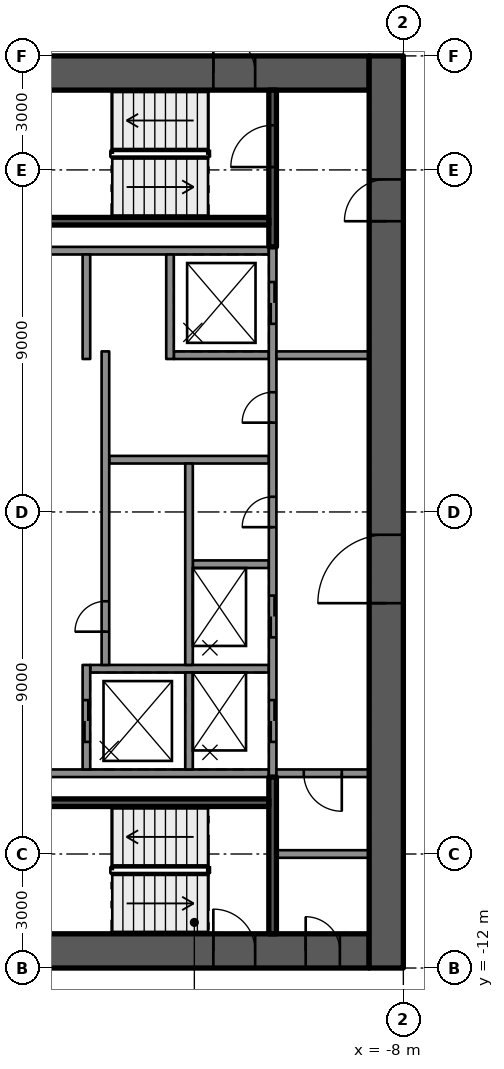
"""IFC4 building model, lengths in metres.
Left out: names, types, materials, properties, quantities, classifications, styles, units other than length and angle.
Written with IfcOpenShell. Run it as: python <this file> out.ifc"""

import sys

from ifc_helpers import new_model, si_unit, direction, frame, frame_2d, origin, place, context, subcontext, project, spatial, rectangle, extrude, element, fill, save


model = new_model("IFC4")
c1 = context("Model", 3, precision=1e-05, world=origin(), true_north=direction((0.0, 1.0)))
c2 = subcontext(c1, "Body", "Model", "MODEL_VIEW")
j1 = project(units=[si_unit("LENGTHUNIT", "METRE"), si_unit("PLANEANGLEUNIT", "RADIAN")], contexts=[c1])
p1 = place(None, origin())
s1 = spatial("IfcSite", under=j1, at=p1, CompositionType="ELEMENT")
p2 = place(p1, origin())
s2 = spatial("IfcBuilding", under=s1, at=p2, CompositionType="ELEMENT")
p3 = place(p2, frame((0.0, 0.0, 246.0)))
s3 = spatial("IfcBuildingStorey", under=s2, at=p3, CompositionType="ELEMENT", Elevation=246.0)
p4 = place(p3, frame((-18.1, 11.55, 0.0), z_axis=(0.0, 0.0, 1.0), x_axis=(1.0, 0.0, 0.0)))
e1 = element("IfcWall", 1, at=p4, inside=s3, PredefinedType="SHEAR", context=c2, shape_type="SweptSolid", body=[
    extrude(rectangle(XDim=9.2, YDim=0.9, at=frame_2d((4.6, 0.0))), origin(), (0.0, 0.0, 1.0), 3.5),
])
p5 = place(p4, frame((5.1, 0.0, 0.0)))
e2 = element("IfcOpeningElement", 2, at=p5, cuts=e1, PredefinedType="OPENING", context=c2, shape_type="SweptSolid", body=[
    extrude(rectangle(XDim=1.1, YDim=2.1, at=frame_2d((0.55, 1.05))), frame((0.0, 0.46, 0.0), z_axis=(0.0, -1.0, 0.0), x_axis=(1.0, 0.0, 0.0)), (0.0, 0.0, 1.0), 0.92),
])
p6 = place(p3, frame((-18.1, -11.55, 0.0), z_axis=(0.0, 0.0, 1.0), x_axis=(1.0, 0.0, 0.0)))
e3 = element("IfcWall", 3, at=p6, inside=s3, PredefinedType="SHEAR", context=c2, shape_type="SweptSolid", body=[
    extrude(rectangle(XDim=9.2, YDim=0.9, at=frame_2d((4.6, 0.0))), origin(), (0.0, 0.0, 1.0), 3.5),
])
p7 = place(p6, frame((5.1, 0.0, 0.0)))
e4 = element("IfcOpeningElement", 4, at=p7, cuts=e3, PredefinedType="OPENING", context=c2, shape_type="SweptSolid", body=[
    extrude(rectangle(XDim=1.1, YDim=2.1, at=frame_2d((0.55, 1.05))), frame((0.0, 0.46, 0.0), z_axis=(0.0, -1.0, 0.0), x_axis=(1.0, 0.0, 0.0)), (0.0, 0.0, 1.0), 0.92),
])
p8 = place(p6, frame((7.53, 0.0, 0.0)))
e5 = element("IfcOpeningElement", 5, at=p8, cuts=e3, PredefinedType="OPENING", context=c2, shape_type="SweptSolid", body=[
    extrude(rectangle(XDim=0.9, YDim=2.1, at=frame_2d((0.45, 1.05))), frame((0.0, 0.46, 0.0), z_axis=(0.0, -1.0, 0.0), x_axis=(1.0, 0.0, 0.0)), (0.0, 0.0, 1.0), 0.92),
])
p9 = place(p3, frame((-8.45, -12.0, 0.0), z_axis=(0.0, 0.0, 1.0), x_axis=(0.0, 1.0, 0.0)))
e6 = element("IfcWall", 6, at=p9, inside=s3, PredefinedType="SHEAR", context=c2, shape_type="SweptSolid", body=[
    extrude(rectangle(XDim=24.0, YDim=0.9, at=frame_2d((12.0, 0.0))), origin(), (0.0, 0.0, 1.0), 3.5),
])
p10 = place(p9, frame((9.6, 0.0, 0.0)))
e7 = element("IfcOpeningElement", 7, at=p10, cuts=e6, PredefinedType="OPENING", context=c2, shape_type="SweptSolid", body=[
    extrude(rectangle(XDim=1.8, YDim=2.1, at=frame_2d((0.9, 1.05))), frame((0.0, 0.46, 0.0), z_axis=(0.0, -1.0, 0.0), x_axis=(1.0, 0.0, 0.0)), (0.0, 0.0, 1.0), 0.92),
])
p11 = place(p9, frame((19.65, 0.0, 0.0)))
e8 = element("IfcOpeningElement", 8, at=p11, cuts=e6, PredefinedType="OPENING", context=c2, shape_type="SweptSolid", body=[
    extrude(rectangle(XDim=1.1, YDim=2.1, at=frame_2d((0.55, 1.05))), frame((0.0, 0.46, 0.0), z_axis=(0.0, -1.0, 0.0), x_axis=(1.0, 0.0, 0.0)), (0.0, 0.0, 1.0), 0.92),
])
for number, where, z_axis, x_axis in (
    (9, (-11.54, 6.875, 0.0), (0.0, 0.0, 1.0), (-1.0, 0.0, 0.0)),
    (10, (-11.54, -6.875, 0.0), (0.0, 0.0, 1.0), (-1.0, 0.0, 0.0)),
):
    element("IfcWall", number, at=place(p3, frame(where, z_axis=z_axis, x_axis=x_axis)), inside=s3, PredefinedType="SOLIDWALL", context=c2, shape_type="SweptSolid", body=[
        extrude(rectangle(XDim=6.56, YDim=0.2, at=frame_2d((3.28, 0.0))), origin(), (0.0, 0.0, 1.0), 3.08),
    ])
p12 = place(p3, frame((-11.54, -4.125, 0.0), z_axis=(0.0, 0.0, 1.0), x_axis=(-1.0, 0.0, 0.0)))
e11 = element("IfcWall", 11, at=p12, inside=s3, PredefinedType="SOLIDWALL", context=c2, shape_type="SweptSolid", body=[
    extrude(rectangle(XDim=4.7, YDim=0.2, at=frame_2d((2.35, 0.0))), origin(), (0.0, 0.0, 1.0), 3.08),
])
p13 = place(p3, frame((-11.54, -1.375, 0.0), z_axis=(0.0, 0.0, 1.0), x_axis=(-1.0, 0.0, 0.0)))
e12 = element("IfcWall", 12, at=p13, inside=s3, PredefinedType="SOLIDWALL", context=c2, shape_type="SweptSolid", body=[
    extrude(rectangle(XDim=2.0, YDim=0.2, at=frame_2d((1.0, 0.0))), origin(), (0.0, 0.0, 1.0), 3.08),
])
p14 = place(p3, frame((-11.54, 1.375, 0.0), z_axis=(0.0, 0.0, 1.0), x_axis=(-1.0, 0.0, 0.0)))
e13 = element("IfcWall", 13, at=p14, inside=s3, PredefinedType="SOLIDWALL", context=c2, shape_type="SweptSolid", body=[
    extrude(rectangle(XDim=4.2, YDim=0.2, at=frame_2d((2.1, 0.0))), origin(), (0.0, 0.0, 1.0), 3.08),
])
p15 = place(p3, frame((-11.54, 4.125, 0.0), z_axis=(0.0, 0.0, 1.0), x_axis=(-1.0, 0.0, 0.0)))
e14 = element("IfcWall", 14, at=p15, inside=s3, PredefinedType="SOLIDWALL", context=c2, shape_type="SweptSolid", body=[
    extrude(rectangle(XDim=2.5, YDim=0.2, at=frame_2d((1.25, 0.0))), origin(), (0.0, 0.0, 1.0), 3.08),
])
p16 = place(p3, frame((-11.44, -6.975, 0.0), z_axis=(0.0, 0.0, 1.0), x_axis=(0.0, 1.0, 0.0)))
e15 = element("IfcWall", 15, at=p16, inside=s3, PredefinedType="SOLIDWALL", context=c2, shape_type="SweptSolid", body=[
    extrude(rectangle(XDim=13.95, YDim=0.2, at=frame_2d((6.975, 0.0))), origin(), (0.0, 0.0, 1.0), 3.08),
])
p17 = place(p16, frame((0.925, 0.0, 0.0)))
e16 = element("IfcOpeningElement", 16, at=p17, cuts=e15, PredefinedType="OPENING", context=c2, shape_type="SweptSolid", body=[
    extrude(rectangle(XDim=1.1, YDim=2.1, at=frame_2d((0.55, 1.05))), frame((0.0, 0.11, 0.0), z_axis=(0.0, -1.0, 0.0), x_axis=(1.0, 0.0, 0.0)), (0.0, 0.0, 1.0), 0.22),
])
p18 = place(p16, frame((3.675, 0.0, 0.0)))
e17 = element("IfcOpeningElement", 17, at=p18, cuts=e15, PredefinedType="OPENING", context=c2, shape_type="SweptSolid", body=[
    extrude(rectangle(XDim=1.1, YDim=2.1, at=frame_2d((0.55, 1.05))), frame((0.0, 0.11, 0.0), z_axis=(0.0, -1.0, 0.0), x_axis=(1.0, 0.0, 0.0)), (0.0, 0.0, 1.0), 0.22),
])
p19 = place(p16, frame((11.925, 0.0, 0.0)))
e18 = element("IfcOpeningElement", 18, at=p19, cuts=e15, PredefinedType="OPENING", context=c2, shape_type="SweptSolid", body=[
    extrude(rectangle(XDim=1.1, YDim=2.1, at=frame_2d((0.55, 1.05))), frame((0.0, 0.11, 0.0), z_axis=(0.0, -1.0, 0.0), x_axis=(1.0, 0.0, 0.0)), (0.0, 0.0, 1.0), 0.22),
])
p20 = place(p16, frame((6.575, 0.0, 0.0)))
e19 = element("IfcOpeningElement", 19, at=p20, cuts=e15, PredefinedType="OPENING", context=c2, shape_type="SweptSolid", body=[
    extrude(rectangle(XDim=0.8, YDim=2.1, at=frame_2d((0.4, 1.05))), frame((0.0, 0.11, 0.0), z_axis=(0.0, -1.0, 0.0), x_axis=(1.0, 0.0, 0.0)), (0.0, 0.0, 1.0), 0.22),
])
p21 = place(p16, frame((9.325, 0.0, 0.0)))
e20 = element("IfcOpeningElement", 20, at=p21, cuts=e15, PredefinedType="OPENING", context=c2, shape_type="SweptSolid", body=[
    extrude(rectangle(XDim=0.8, YDim=2.1, at=frame_2d((0.4, 1.05))), frame((0.0, 0.11, 0.0), z_axis=(0.0, -1.0, 0.0), x_axis=(1.0, 0.0, 0.0)), (0.0, 0.0, 1.0), 0.22),
])
p22 = place(p3, frame((-13.64, -6.775, 0.0), z_axis=(0.0, 0.0, 1.0), x_axis=(0.0, 1.0, 0.0)))
e21 = element("IfcWall", 21, at=p22, inside=s3, PredefinedType="SOLIDWALL", context=c2, shape_type="SweptSolid", body=[
    extrude(rectangle(XDim=2.55, YDim=0.2, at=frame_2d((1.275, 0.0))), origin(), (0.0, 0.0, 1.0), 3.08),
])
p23 = place(p3, frame((-13.64, -4.025, 0.0), z_axis=(0.0, 0.0, 1.0), x_axis=(0.0, 1.0, 0.0)))
e22 = element("IfcWall", 22, at=p23, inside=s3, PredefinedType="SOLIDWALL", context=c2, shape_type="SweptSolid", body=[
    extrude(rectangle(XDim=5.3, YDim=0.2, at=frame_2d((2.65, 0.0))), origin(), (0.0, 0.0, 1.0), 3.08),
])
p24 = place(p3, frame((-14.14, 4.025, 0.0), z_axis=(0.0, 0.0, 1.0), x_axis=(0.0, 1.0, 0.0)))
e23 = element("IfcWall", 23, at=p24, inside=s3, PredefinedType="SOLIDWALL", context=c2, shape_type="SweptSolid", body=[
    extrude(rectangle(XDim=2.75, YDim=0.2, at=frame_2d((1.375, 0.0))), origin(), (0.0, 0.0, 1.0), 3.08),
])
p25 = place(p3, frame((-16.34, -6.775, 0.0), z_axis=(0.0, 0.0, 1.0), x_axis=(0.0, 1.0, 0.0)))
e24 = element("IfcWall", 24, at=p25, inside=s3, PredefinedType="SOLIDWALL", context=c2, shape_type="SweptSolid", body=[
    extrude(rectangle(XDim=2.75, YDim=0.2, at=frame_2d((1.375, 0.0))), origin(), (0.0, 0.0, 1.0), 3.08),
])
p26 = place(p25, frame((0.725, 0.0, 0.0)))
e25 = element("IfcOpeningElement", 25, at=p26, cuts=e24, PredefinedType="OPENING", context=c2, shape_type="SweptSolid", body=[
    extrude(rectangle(XDim=1.1, YDim=2.1, at=frame_2d((0.55, 1.05))), frame((0.0, 0.11, 0.0), z_axis=(0.0, -1.0, 0.0), x_axis=(1.0, 0.0, 0.0)), (0.0, 0.0, 1.0), 0.22),
])
p27 = place(p3, frame((-15.84, -4.025, 0.0), z_axis=(0.0, 0.0, 1.0), x_axis=(0.0, 1.0, 0.0)))
e26 = element("IfcWall", 26, at=p27, inside=s3, PredefinedType="SOLIDWALL", context=c2, shape_type="SweptSolid", body=[
    extrude(rectangle(XDim=8.25, YDim=0.2, at=frame_2d((4.125, 0.0))), origin(), (0.0, 0.0, 1.0), 3.08),
])
p28 = place(p27, frame((0.875, 0.0, 0.0)))
e27 = element("IfcOpeningElement", 27, at=p28, cuts=e26, PredefinedType="OPENING", context=c2, shape_type="SweptSolid", body=[
    extrude(rectangle(XDim=0.8, YDim=2.1, at=frame_2d((0.4, 1.05))), frame((0.0, 0.11, 0.0), z_axis=(0.0, -1.0, 0.0), x_axis=(1.0, 0.0, 0.0)), (0.0, 0.0, 1.0), 0.22),
])
p29 = place(p3, frame((-16.34, 4.025, 0.0), z_axis=(0.0, 0.0, 1.0), x_axis=(0.0, 1.0, 0.0)))
e28 = element("IfcWall", 28, at=p29, inside=s3, PredefinedType="SOLIDWALL", context=c2, shape_type="SweptSolid", body=[
    extrude(rectangle(XDim=2.75, YDim=0.2, at=frame_2d((1.375, 0.0))), origin(), (0.0, 0.0, 1.0), 3.08),
])
p30 = place(p3, frame((-11.44, 6.975, 0.0), z_axis=(0.0, 0.0, 1.0), x_axis=(0.0, 1.0, 0.0)))
e29 = element("IfcWall", 29, at=p30, inside=s3, PredefinedType="SOLIDWALL", context=c2, shape_type="SweptSolid", body=[
    extrude(rectangle(XDim=4.125, YDim=0.2, at=frame_2d((2.062, 0.0))), origin(), (0.0, 0.0, 1.0), 3.08),
])
p31 = place(p30, frame((2.1, 0.0, 0.0)))
e30 = element("IfcOpeningElement", 30, at=p31, cuts=e29, PredefinedType="OPENING", context=c2, shape_type="SweptSolid", body=[
    extrude(rectangle(XDim=1.1, YDim=2.1, at=frame_2d((0.55, 1.05))), frame((0.0, 0.11, 0.0), z_axis=(0.0, -1.0, 0.0), x_axis=(1.0, 0.0, 0.0)), (0.0, 0.0, 1.0), 0.22),
])
p32 = place(p3, frame((-11.54, 7.65, 0.0), z_axis=(0.0, 0.0, 1.0), x_axis=(-1.0, 0.0, 0.0)))
e31 = element("IfcWall", 31, at=p32, inside=s3, PredefinedType="SOLIDWALL", context=c2, shape_type="SweptSolid", body=[
    extrude(rectangle(XDim=6.56, YDim=0.2, at=frame_2d((3.28, 0.0))), origin(), (0.0, 0.0, 1.0), 3.08),
])
p33 = place(p3, frame((-11.44, -11.1, 0.0), z_axis=(0.0, 0.0, 1.0), x_axis=(0.0, 1.0, 0.0)))
e32 = element("IfcWall", 32, at=p33, inside=s3, PredefinedType="SOLIDWALL", context=c2, shape_type="SweptSolid", body=[
    extrude(rectangle(XDim=4.125, YDim=0.2, at=frame_2d((2.062, 0.0))), origin(), (0.0, 0.0, 1.0), 3.08),
])
p34 = place(p3, frame((-11.54, -7.65, 0.0), z_axis=(0.0, 0.0, 1.0), x_axis=(-1.0, 0.0, 0.0)))
e33 = element("IfcWall", 33, at=p34, inside=s3, PredefinedType="SOLIDWALL", context=c2, shape_type="SweptSolid", body=[
    extrude(rectangle(XDim=6.56, YDim=0.2, at=frame_2d((3.28, 0.0))), origin(), (0.0, 0.0, 1.0), 3.08),
])
p35 = place(p3, frame((-8.9, 4.125, 0.0), z_axis=(0.0, 0.0, 1.0), x_axis=(-1.0, 0.0, 0.0)))
e34 = element("IfcWall", 34, at=p35, inside=s3, PredefinedType="PARTITIONING", context=c2, shape_type="SweptSolid", body=[
    extrude(rectangle(XDim=2.44, YDim=0.2, at=frame_2d((1.22, 0.0))), origin(), (0.0, 0.0, 1.0), 3.08),
])
p36 = place(p3, frame((-8.9, -6.875, 0.0), z_axis=(0.0, 0.0, 1.0), x_axis=(-1.0, 0.0, 0.0)))
e35 = element("IfcWall", 35, at=p36, inside=s3, PredefinedType="PARTITIONING", context=c2, shape_type="SweptSolid", body=[
    extrude(rectangle(XDim=2.44, YDim=0.2, at=frame_2d((1.22, 0.0))), origin(), (0.0, 0.0, 1.0), 3.08),
])
p37 = place(p36, frame((0.72, 0.0, 0.0)))
e36 = element("IfcOpeningElement", 36, at=p37, cuts=e35, PredefinedType="OPENING", context=c2, shape_type="SweptSolid", body=[
    extrude(rectangle(XDim=1.0, YDim=2.1, at=frame_2d((0.5, 1.05))), frame((0.0, 0.11, 0.0), z_axis=(0.0, -1.0, 0.0), x_axis=(1.0, 0.0, 0.0)), (0.0, 0.0, 1.0), 0.22),
])
p38 = place(p3, frame((-8.9, -9.0, 0.0), z_axis=(0.0, 0.0, 1.0), x_axis=(-1.0, 0.0, 0.0)))
e37 = element("IfcWall", 37, at=p38, inside=s3, PredefinedType="PARTITIONING", context=c2, shape_type="SweptSolid", body=[
    extrude(rectangle(XDim=2.44, YDim=0.2, at=frame_2d((1.22, 0.0))), origin(), (0.0, 0.0, 1.0), 3.08),
])
p39 = place(p17, origin())
e38 = element("IfcDoor", 38, at=p39, inside=s3, OperationType="DOUBLE_DOOR_SLIDING", PredefinedType="DOOR", context=c2, shape_type="SweptSolid", body=[
    extrude(rectangle(XDim=1.1, YDim=2.1, at=frame_2d((0.55, 1.05))), frame((0.0, 0.025, 0.0), z_axis=(0.0, -1.0, 0.0), x_axis=(1.0, 0.0, 0.0)), (0.0, 0.0, 1.0), 0.05),
])
fill(e16, e38)
p40 = place(p26, origin())
e39 = element("IfcDoor", 39, at=p40, inside=s3, OperationType="DOUBLE_DOOR_SLIDING", PredefinedType="DOOR", context=c2, shape_type="SweptSolid", body=[
    extrude(rectangle(XDim=1.1, YDim=2.1, at=frame_2d((0.55, 1.05))), frame((0.0, 0.025, 0.0), z_axis=(0.0, -1.0, 0.0), x_axis=(1.0, 0.0, 0.0)), (0.0, 0.0, 1.0), 0.05),
])
fill(e25, e39)
p41 = place(p18, origin())
e40 = element("IfcDoor", 40, at=p41, inside=s3, OperationType="DOUBLE_DOOR_SLIDING", PredefinedType="DOOR", context=c2, shape_type="SweptSolid", body=[
    extrude(rectangle(XDim=1.1, YDim=2.1, at=frame_2d((0.55, 1.05))), frame((0.0, 0.025, 0.0), z_axis=(0.0, -1.0, 0.0), x_axis=(1.0, 0.0, 0.0)), (0.0, 0.0, 1.0), 0.05),
])
fill(e17, e40)
p42 = place(p19, origin())
e41 = element("IfcDoor", 41, at=p42, inside=s3, OperationType="DOUBLE_DOOR_SLIDING", PredefinedType="DOOR", context=c2, shape_type="SweptSolid", body=[
    extrude(rectangle(XDim=1.1, YDim=2.1, at=frame_2d((0.55, 1.05))), frame((0.0, 0.025, 0.0), z_axis=(0.0, -1.0, 0.0), x_axis=(1.0, 0.0, 0.0)), (0.0, 0.0, 1.0), 0.05),
])
fill(e18, e41)
p43 = place(p28, origin())
e42 = element("IfcDoor", 42, at=p43, inside=s3, OperationType="SINGLE_SWING_LEFT", PredefinedType="DOOR", context=c2, shape_type="SweptSolid", body=[
    extrude(rectangle(XDim=0.8, YDim=2.1, at=frame_2d((0.4, 1.05))), frame((0.0, 0.025, 0.0), z_axis=(0.0, -1.0, 0.0), x_axis=(1.0, 0.0, 0.0)), (0.0, 0.0, 1.0), 0.05),
])
fill(e27, e42)
p44 = place(p20, origin())
e43 = element("IfcDoor", 43, at=p44, inside=s3, OperationType="SINGLE_SWING_LEFT", PredefinedType="DOOR", context=c2, shape_type="SweptSolid", body=[
    extrude(rectangle(XDim=0.8, YDim=2.1, at=frame_2d((0.4, 1.05))), frame((0.0, 0.025, 0.0), z_axis=(0.0, -1.0, 0.0), x_axis=(1.0, 0.0, 0.0)), (0.0, 0.0, 1.0), 0.05),
])
fill(e19, e43)
p45 = place(p21, origin())
e44 = element("IfcDoor", 44, at=p45, inside=s3, OperationType="SINGLE_SWING_LEFT", PredefinedType="DOOR", context=c2, shape_type="SweptSolid", body=[
    extrude(rectangle(XDim=0.8, YDim=2.1, at=frame_2d((0.4, 1.05))), frame((0.0, 0.025, 0.0), z_axis=(0.0, -1.0, 0.0), x_axis=(1.0, 0.0, 0.0)), (0.0, 0.0, 1.0), 0.05),
])
fill(e20, e44)
p46 = place(p10, origin())
e45 = element("IfcDoor", 45, at=p46, inside=s3, OperationType="SINGLE_SWING_LEFT", PredefinedType="DOOR", context=c2, shape_type="SweptSolid", body=[
    extrude(rectangle(XDim=1.8, YDim=2.1, at=frame_2d((0.9, 1.05))), frame((0.0, 0.025, 0.0), z_axis=(0.0, -1.0, 0.0), x_axis=(1.0, 0.0, 0.0)), (0.0, 0.0, 1.0), 0.05),
])
fill(e7, e45)
p47 = place(p11, origin())
e46 = element("IfcDoor", 46, at=p47, inside=s3, OperationType="SINGLE_SWING_RIGHT", PredefinedType="DOOR", context=c2, shape_type="SweptSolid", body=[
    extrude(rectangle(XDim=1.1, YDim=2.1, at=frame_2d((0.55, 1.05))), frame((0.0, 0.025, 0.0), z_axis=(0.0, -1.0, 0.0), x_axis=(1.0, 0.0, 0.0)), (0.0, 0.0, 1.0), 0.05),
])
fill(e8, e46)
p48 = place(p5, origin())
e47 = element("IfcDoor", 47, at=p48, inside=s3, OperationType="SINGLE_SWING_RIGHT", PredefinedType="DOOR", context=c2, shape_type="SweptSolid", body=[
    extrude(rectangle(XDim=1.1, YDim=2.1, at=frame_2d((0.55, 1.05))), frame((0.0, 0.025, 0.0), z_axis=(0.0, -1.0, 0.0), x_axis=(1.0, 0.0, 0.0)), (0.0, 0.0, 1.0), 0.05),
])
fill(e2, e47)
p49 = place(p7, origin())
e48 = element("IfcDoor", 48, at=p49, inside=s3, OperationType="SINGLE_SWING_RIGHT", PredefinedType="DOOR", context=c2, shape_type="SweptSolid", body=[
    extrude(rectangle(XDim=1.1, YDim=2.1, at=frame_2d((0.55, 1.05))), frame((0.0, 0.025, 0.0), z_axis=(0.0, -1.0, 0.0), x_axis=(1.0, 0.0, 0.0)), (0.0, 0.0, 1.0), 0.05),
])
fill(e4, e48)
p50 = place(p31, origin())
e49 = element("IfcDoor", 49, at=p50, inside=s3, OperationType="SINGLE_SWING_RIGHT", PredefinedType="DOOR", context=c2, shape_type="SweptSolid", body=[
    extrude(rectangle(XDim=1.1, YDim=2.1, at=frame_2d((0.55, 1.05))), frame((0.0, 0.025, 0.0), z_axis=(0.0, -1.0, 0.0), x_axis=(1.0, 0.0, 0.0)), (0.0, 0.0, 1.0), 0.05),
])
fill(e30, e49)
p51 = place(p8, origin())
e50 = element("IfcDoor", 50, at=p51, inside=s3, OperationType="SINGLE_SWING_RIGHT", PredefinedType="DOOR", context=c2, shape_type="SweptSolid", body=[
    extrude(rectangle(XDim=0.9, YDim=2.1, at=frame_2d((0.45, 1.05))), frame((0.0, 0.025, 0.0), z_axis=(0.0, -1.0, 0.0), x_axis=(1.0, 0.0, 0.0)), (0.0, 0.0, 1.0), 0.05),
])
fill(e5, e50)
p52 = place(p37, origin())
e51 = element("IfcDoor", 51, at=p52, inside=s3, OperationType="SINGLE_SWING_RIGHT", PredefinedType="DOOR", context=c2, shape_type="SweptSolid", body=[
    extrude(rectangle(XDim=1.0, YDim=2.1, at=frame_2d((0.5, 1.05))), frame((0.0, 0.025, 0.0), z_axis=(0.0, -1.0, 0.0), x_axis=(1.0, 0.0, 0.0)), (0.0, 0.0, 1.0), 0.05),
])
fill(e36, e51)
save(model, sys.argv[1])
